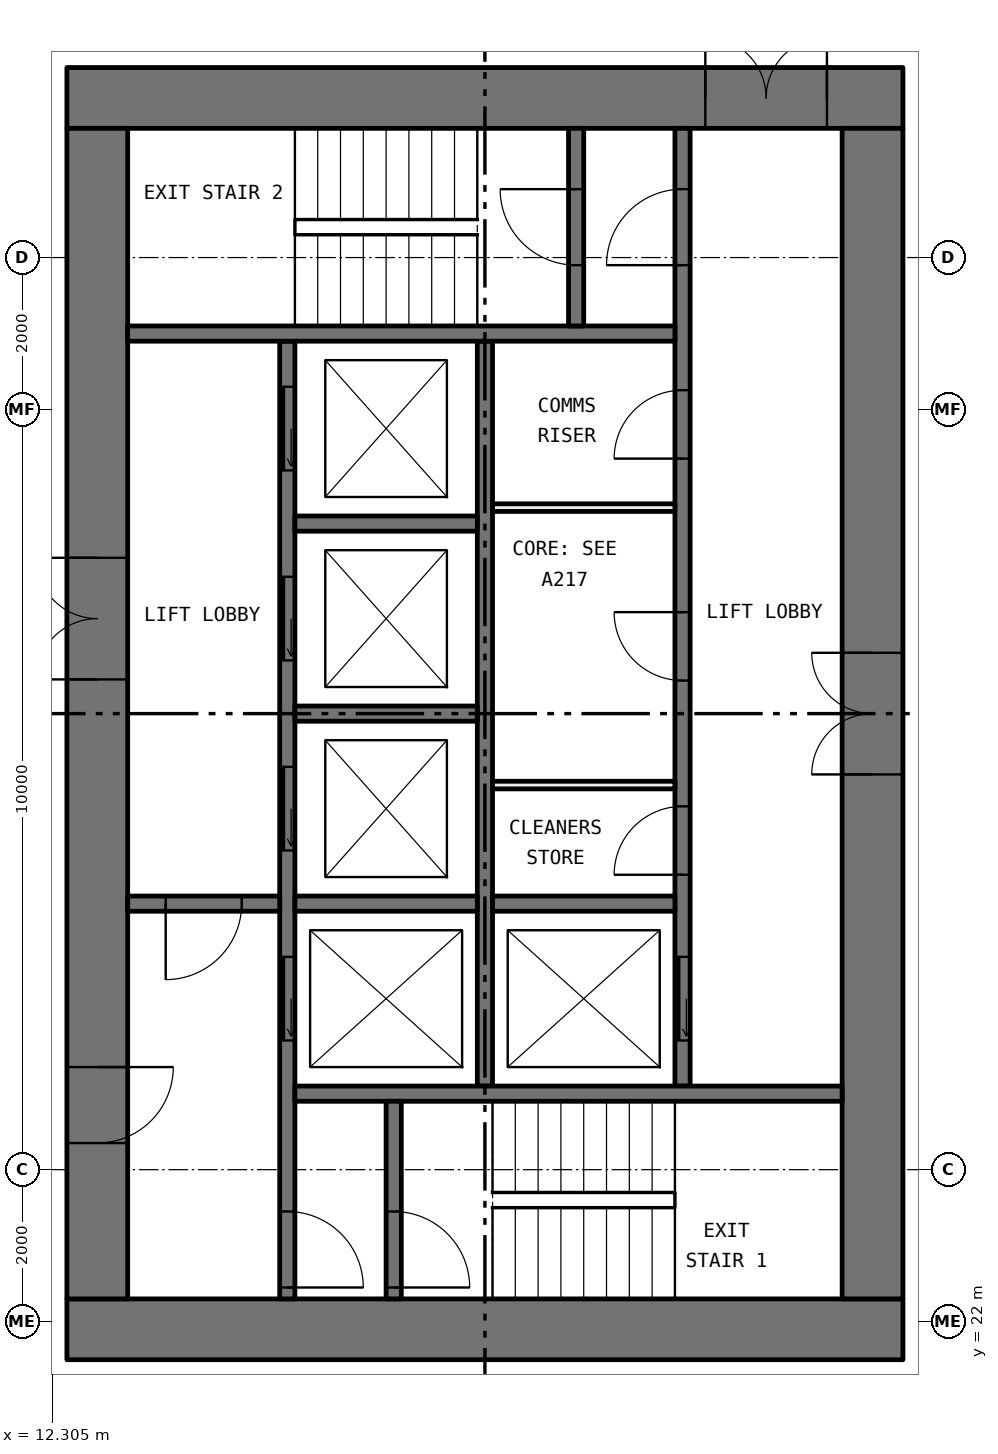
"""IFC4 building model, lengths in metres.
Left out: names, types, materials, properties, quantities, classifications, styles, units other than length and angle.
Written with IfcOpenShell. Run it as: python <this file> out.ifc"""

import sys

from ifc_helpers import new_model, si_unit, direction, frame, frame_2d, origin, place, context, subcontext, project, spatial, rectangle, extrude, element, fill, save


model = new_model("IFC4")
c1 = context("Model", 3, precision=1e-05, world=origin(), true_north=direction((0.0, 1.0)))
c2 = subcontext(c1, "Body", "Model", "MODEL_VIEW")
j1 = project(units=[si_unit("LENGTHUNIT", "METRE"), si_unit("PLANEANGLEUNIT", "RADIAN")], contexts=[c1])
p1 = place(None, origin())
s1 = spatial("IfcSite", under=j1, at=p1, CompositionType="ELEMENT")
p2 = place(p1, origin())
s2 = spatial("IfcBuilding", under=s1, at=p2, CompositionType="ELEMENT")
p3 = place(p2, frame((0.0, 0.0, 67.95)))
s3 = spatial("IfcBuildingStorey", under=s2, at=p3, CompositionType="ELEMENT", Elevation=67.95)
p4 = place(p3, frame((12.5, 21.9, 0.0), z_axis=(0.0, 0.0, 1.0), x_axis=(1.0, 0.0, 0.0)))
e1 = element("IfcWall", 1, at=p4, inside=s3, PredefinedType="SHEAR", context=c2, shape_type="SweptSolid", body=[
    extrude(rectangle(XDim=11.0, YDim=0.8, at=frame_2d((5.5, 0.0))), origin(), (0.0, 0.0, 1.0), 3.05),
])
p5 = place(p3, frame((12.5, 38.1, 0.0), z_axis=(0.0, 0.0, 1.0), x_axis=(1.0, 0.0, 0.0)))
e2 = element("IfcWall", 2, at=p5, inside=s3, PredefinedType="SHEAR", context=c2, shape_type="SweptSolid", body=[
    extrude(rectangle(XDim=11.0, YDim=0.8, at=frame_2d((5.5, 0.0))), origin(), (0.0, 0.0, 1.0), 3.05),
])
p6 = place(p5, frame((8.4, 0.0, 0.0)))
e3 = element("IfcOpeningElement", 3, at=p6, cuts=e2, PredefinedType="OPENING", context=c2, shape_type="SweptSolid", body=[
    extrude(rectangle(XDim=1.6, YDim=2.1, at=frame_2d((0.8, 1.05))), frame((0.0, 0.41, 0.0), z_axis=(0.0, -1.0, 0.0), x_axis=(1.0, 0.0, 0.0)), (0.0, 0.0, 1.0), 0.82),
])
p7 = place(p3, frame((12.9, 22.3, 0.0), z_axis=(0.0, 0.0, 1.0), x_axis=(0.0, 1.0, 0.0)))
e4 = element("IfcWall", 4, at=p7, inside=s3, PredefinedType="SHEAR", context=c2, shape_type="SweptSolid", body=[
    extrude(rectangle(XDim=15.4, YDim=0.8, at=frame_2d((7.7, 0.0))), origin(), (0.0, 0.0, 1.0), 3.05),
])
p8 = place(p7, frame((8.15, 0.0, 0.0)))
e5 = element("IfcOpeningElement", 5, at=p8, cuts=e4, PredefinedType="OPENING", context=c2, shape_type="SweptSolid", body=[
    extrude(rectangle(XDim=1.6, YDim=2.1, at=frame_2d((0.8, 1.05))), frame((0.0, 0.41, 0.0), z_axis=(0.0, -1.0, 0.0), x_axis=(1.0, 0.0, 0.0)), (0.0, 0.0, 1.0), 0.82),
])
p9 = place(p7, frame((2.05, 0.0, 0.0)))
e6 = element("IfcOpeningElement", 6, at=p9, cuts=e4, PredefinedType="OPENING", context=c2, shape_type="SweptSolid", body=[
    extrude(rectangle(XDim=1.0, YDim=2.1, at=frame_2d((0.5, 1.05))), frame((0.0, 0.41, 0.0), z_axis=(0.0, -1.0, 0.0), x_axis=(1.0, 0.0, 0.0)), (0.0, 0.0, 1.0), 0.82),
])
p10 = place(p3, frame((23.1, 22.3, 0.0), z_axis=(0.0, 0.0, 1.0), x_axis=(0.0, 1.0, 0.0)))
e7 = element("IfcWall", 7, at=p10, inside=s3, PredefinedType="SHEAR", context=c2, shape_type="SweptSolid", body=[
    extrude(rectangle(XDim=15.4, YDim=0.8, at=frame_2d((7.7, 0.0))), origin(), (0.0, 0.0, 1.0), 3.05),
])
p11 = place(p10, frame((6.9, 0.0, 0.0)))
e8 = element("IfcOpeningElement", 8, at=p11, cuts=e7, PredefinedType="OPENING", context=c2, shape_type="SweptSolid", body=[
    extrude(rectangle(XDim=1.6, YDim=2.1, at=frame_2d((0.8, 1.05))), frame((0.0, 0.41, 0.0), z_axis=(0.0, -1.0, 0.0), x_axis=(1.0, 0.0, 0.0)), (0.0, 0.0, 1.0), 0.82),
])
p12 = place(p3, frame((15.4, 22.3, 0.0), z_axis=(0.0, 0.0, 1.0), x_axis=(0.0, 1.0, 0.0)))
e9 = element("IfcWall", 9, at=p12, inside=s3, PredefinedType="SOLIDWALL", context=c2, shape_type="SweptSolid", body=[
    extrude(rectangle(XDim=12.6, YDim=0.2, at=frame_2d((6.3, 0.0))), origin(), (0.0, 0.0, 1.0), 3.05),
])
p13 = place(p12, frame((3.4, 0.0, 0.0)))
e10 = element("IfcOpeningElement", 10, at=p13, cuts=e9, PredefinedType="OPENING", context=c2, shape_type="SweptSolid", body=[
    extrude(rectangle(XDim=1.1, YDim=2.1, at=frame_2d((0.55, 1.05))), frame((0.0, 0.11, 0.0), z_axis=(0.0, -1.0, 0.0), x_axis=(1.0, 0.0, 0.0)), (0.0, 0.0, 1.0), 0.22),
])
p14 = place(p12, frame((5.9, 0.0, 0.0)))
e11 = element("IfcOpeningElement", 11, at=p14, cuts=e9, PredefinedType="OPENING", context=c2, shape_type="SweptSolid", body=[
    extrude(rectangle(XDim=1.1, YDim=2.1, at=frame_2d((0.55, 1.05))), frame((0.0, 0.11, 0.0), z_axis=(0.0, -1.0, 0.0), x_axis=(1.0, 0.0, 0.0)), (0.0, 0.0, 1.0), 0.22),
])
p15 = place(p12, frame((8.4, 0.0, 0.0)))
e12 = element("IfcOpeningElement", 12, at=p15, cuts=e9, PredefinedType="OPENING", context=c2, shape_type="SweptSolid", body=[
    extrude(rectangle(XDim=1.1, YDim=2.1, at=frame_2d((0.55, 1.05))), frame((0.0, 0.11, 0.0), z_axis=(0.0, -1.0, 0.0), x_axis=(1.0, 0.0, 0.0)), (0.0, 0.0, 1.0), 0.22),
])
p16 = place(p12, frame((10.9, 0.0, 0.0)))
e13 = element("IfcOpeningElement", 13, at=p16, cuts=e9, PredefinedType="OPENING", context=c2, shape_type="SweptSolid", body=[
    extrude(rectangle(XDim=1.1, YDim=2.1, at=frame_2d((0.55, 1.05))), frame((0.0, 0.11, 0.0), z_axis=(0.0, -1.0, 0.0), x_axis=(1.0, 0.0, 0.0)), (0.0, 0.0, 1.0), 0.22),
])
p17 = place(p12, frame((0.15, 0.0, 0.0)))
e14 = element("IfcOpeningElement", 14, at=p17, cuts=e9, PredefinedType="OPENING", context=c2, shape_type="SweptSolid", body=[
    extrude(rectangle(XDim=1.0, YDim=2.1, at=frame_2d((0.5, 1.05))), frame((0.0, 0.11, 0.0), z_axis=(0.0, -1.0, 0.0), x_axis=(1.0, 0.0, 0.0)), (0.0, 0.0, 1.0), 0.22),
])
p18 = place(p3, frame((20.6, 25.1, 0.0), z_axis=(0.0, 0.0, 1.0), x_axis=(0.0, 1.0, 0.0)))
e15 = element("IfcWall", 15, at=p18, inside=s3, PredefinedType="SOLIDWALL", context=c2, shape_type="SweptSolid", body=[
    extrude(rectangle(XDim=12.6, YDim=0.2, at=frame_2d((6.3, 0.0))), origin(), (0.0, 0.0, 1.0), 3.05),
])
p19 = place(p18, frame((0.6, 0.0, 0.0)))
e16 = element("IfcOpeningElement", 16, at=p19, cuts=e15, PredefinedType="OPENING", context=c2, shape_type="SweptSolid", body=[
    extrude(rectangle(XDim=1.1, YDim=2.1, at=frame_2d((0.55, 1.05))), frame((0.0, 0.11, 0.0), z_axis=(0.0, -1.0, 0.0), x_axis=(1.0, 0.0, 0.0)), (0.0, 0.0, 1.0), 0.22),
])
p20 = place(p18, frame((10.8, 0.0, 0.0)))
e17 = element("IfcOpeningElement", 17, at=p20, cuts=e15, PredefinedType="OPENING", context=c2, shape_type="SweptSolid", body=[
    extrude(rectangle(XDim=1.0, YDim=2.1, at=frame_2d((0.5, 1.05))), frame((0.0, 0.11, 0.0), z_axis=(0.0, -1.0, 0.0), x_axis=(1.0, 0.0, 0.0)), (0.0, 0.0, 1.0), 0.22),
])
p21 = place(p18, frame((2.78, 0.0, 0.0)))
e18 = element("IfcOpeningElement", 18, at=p21, cuts=e15, PredefinedType="OPENING", context=c2, shape_type="SweptSolid", body=[
    extrude(rectangle(XDim=0.9, YDim=2.1, at=frame_2d((0.45, 1.05))), frame((0.0, 0.11, 0.0), z_axis=(0.0, -1.0, 0.0), x_axis=(1.0, 0.0, 0.0)), (0.0, 0.0, 1.0), 0.22),
])
p22 = place(p18, frame((5.335, 0.0, 0.0)))
e19 = element("IfcOpeningElement", 19, at=p22, cuts=e15, PredefinedType="OPENING", context=c2, shape_type="SweptSolid", body=[
    extrude(rectangle(XDim=0.9, YDim=2.1, at=frame_2d((0.45, 1.05))), frame((0.0, 0.11, 0.0), z_axis=(0.0, -1.0, 0.0), x_axis=(1.0, 0.0, 0.0)), (0.0, 0.0, 1.0), 0.22),
])
p23 = place(p18, frame((8.255, 0.0, 0.0)))
e20 = element("IfcOpeningElement", 20, at=p23, cuts=e15, PredefinedType="OPENING", context=c2, shape_type="SweptSolid", body=[
    extrude(rectangle(XDim=0.9, YDim=2.1, at=frame_2d((0.45, 1.05))), frame((0.0, 0.11, 0.0), z_axis=(0.0, -1.0, 0.0), x_axis=(1.0, 0.0, 0.0)), (0.0, 0.0, 1.0), 0.22),
])
p24 = place(p3, frame((18.0, 25.1, 0.0), z_axis=(0.0, 0.0, 1.0), x_axis=(0.0, 1.0, 0.0)))
e21 = element("IfcWall", 21, at=p24, inside=s3, PredefinedType="SOLIDWALL", context=c2, shape_type="SweptSolid", body=[
    extrude(rectangle(XDim=9.8, YDim=0.2, at=frame_2d((4.9, 0.0))), origin(), (0.0, 0.0, 1.0), 3.05),
])
for number, where, z_axis, x_axis in (
    (22, (15.5, 25.0, 0.0), (0.0, 0.0, 1.0), (1.0, 0.0, 0.0)),
    (23, (13.3, 35.0, 0.0), (0.0, 0.0, 1.0), (1.0, 0.0, 0.0)),
):
    element("IfcWall", number, at=place(p3, frame(where, z_axis=z_axis, x_axis=x_axis)), inside=s3, PredefinedType="SOLIDWALL", context=c2, shape_type="SweptSolid", body=[
        extrude(rectangle(XDim=7.2, YDim=0.2, at=frame_2d((3.6, 0.0))), origin(), (0.0, 0.0, 1.0), 3.05),
    ])
p25 = place(p3, frame((13.3, 27.5, 0.0), z_axis=(0.0, 0.0, 1.0), x_axis=(1.0, 0.0, 0.0)))
e24 = element("IfcWall", 24, at=p25, inside=s3, PredefinedType="SOLIDWALL", context=c2, shape_type="SweptSolid", body=[
    extrude(rectangle(XDim=2.0, YDim=0.2, at=frame_2d((1.0, 0.0))), origin(), (0.0, 0.0, 1.0), 3.05),
])
p26 = place(p25, frame((0.5, 0.0, 0.0)))
e25 = element("IfcOpeningElement", 25, at=p26, cuts=e24, PredefinedType="OPENING", context=c2, shape_type="SweptSolid", body=[
    extrude(rectangle(XDim=1.0, YDim=2.1, at=frame_2d((0.5, 1.05))), frame((0.0, 0.11, 0.0), z_axis=(0.0, -1.0, 0.0), x_axis=(1.0, 0.0, 0.0)), (0.0, 0.0, 1.0), 0.22),
])
p27 = place(p3, frame((16.8, 22.3, 0.0), z_axis=(0.0, 0.0, 1.0), x_axis=(0.0, 1.0, 0.0)))
e26 = element("IfcWall", 26, at=p27, inside=s3, PredefinedType="SOLIDWALL", context=c2, shape_type="SweptSolid", body=[
    extrude(rectangle(XDim=2.6, YDim=0.2, at=frame_2d((1.3, 0.0))), origin(), (0.0, 0.0, 1.0), 3.05),
])
p28 = place(p27, frame((0.15, 0.0, 0.0)))
e27 = element("IfcOpeningElement", 27, at=p28, cuts=e26, PredefinedType="OPENING", context=c2, shape_type="SweptSolid", body=[
    extrude(rectangle(XDim=1.0, YDim=2.1, at=frame_2d((0.5, 1.05))), frame((0.0, 0.11, 0.0), z_axis=(0.0, -1.0, 0.0), x_axis=(1.0, 0.0, 0.0)), (0.0, 0.0, 1.0), 0.22),
])
p29 = place(p3, frame((19.2, 35.1, 0.0), z_axis=(0.0, 0.0, 1.0), x_axis=(0.0, 1.0, 0.0)))
e28 = element("IfcWall", 28, at=p29, inside=s3, PredefinedType="SOLIDWALL", context=c2, shape_type="SweptSolid", body=[
    extrude(rectangle(XDim=2.6, YDim=0.2, at=frame_2d((1.3, 0.0))), origin(), (0.0, 0.0, 1.0), 3.05),
])
p30 = place(p29, frame((0.8, 0.0, 0.0)))
e29 = element("IfcOpeningElement", 29, at=p30, cuts=e28, PredefinedType="OPENING", context=c2, shape_type="SweptSolid", body=[
    extrude(rectangle(XDim=1.0, YDim=2.1, at=frame_2d((0.5, 1.05))), frame((0.0, 0.11, 0.0), z_axis=(0.0, -1.0, 0.0), x_axis=(1.0, 0.0, 0.0)), (0.0, 0.0, 1.0), 0.22),
])
for number, where, z_axis, x_axis in (
    (30, (15.5, 27.5, 0.0), (0.0, 0.0, 1.0), (1.0, 0.0, 0.0)),
    (31, (15.5, 30.0, 0.0), (0.0, 0.0, 1.0), (1.0, 0.0, 0.0)),
    (32, (15.5, 32.5, 0.0), (0.0, 0.0, 1.0), (1.0, 0.0, 0.0)),
    (33, (18.1, 27.5, 0.0), (0.0, 0.0, 1.0), (1.0, 0.0, 0.0)),
):
    element("IfcWall", number, at=place(p3, frame(where, z_axis=z_axis, x_axis=x_axis)), inside=s3, PredefinedType="SOLIDWALL", context=c2, shape_type="SweptSolid", body=[
        extrude(rectangle(XDim=2.4, YDim=0.2, at=frame_2d((1.2, 0.0))), origin(), (0.0, 0.0, 1.0), 3.05),
    ])
for number, where, z_axis, x_axis in (
    (34, (18.1, 29.06, 0.0), (0.0, 0.0, 1.0), (1.0, 0.0, 0.0)),
    (35, (18.1, 32.71, 0.0), (0.0, 0.0, 1.0), (1.0, 0.0, 0.0)),
):
    element("IfcWall", number, at=place(p3, frame(where, z_axis=z_axis, x_axis=x_axis)), inside=s3, PredefinedType="PARTITIONING", context=c2, shape_type="SweptSolid", body=[
        extrude(rectangle(XDim=2.4, YDim=0.1, at=frame_2d((1.2, 0.0))), origin(), (0.0, 0.0, 1.0), 3.05),
    ])
p31 = place(p19, origin())
e36 = element("IfcDoor", 36, at=p31, inside=s3, OperationType="SLIDING_TO_LEFT", PredefinedType="DOOR", context=c2, shape_type="SweptSolid", body=[
    extrude(rectangle(XDim=1.1, YDim=2.1, at=frame_2d((0.55, 1.05))), frame((0.0, 0.025, 0.0), z_axis=(0.0, -1.0, 0.0), x_axis=(1.0, 0.0, 0.0)), (0.0, 0.0, 1.0), 0.05),
])
fill(e16, e36)
p32 = place(p13, origin())
e37 = element("IfcDoor", 37, at=p32, inside=s3, OperationType="SLIDING_TO_LEFT", PredefinedType="DOOR", context=c2, shape_type="SweptSolid", body=[
    extrude(rectangle(XDim=1.1, YDim=2.1, at=frame_2d((0.55, 1.05))), frame((0.0, 0.025, 0.0), z_axis=(0.0, -1.0, 0.0), x_axis=(1.0, 0.0, 0.0)), (0.0, 0.0, 1.0), 0.05),
])
fill(e10, e37)
p33 = place(p14, origin())
e38 = element("IfcDoor", 38, at=p33, inside=s3, OperationType="SLIDING_TO_LEFT", PredefinedType="DOOR", context=c2, shape_type="SweptSolid", body=[
    extrude(rectangle(XDim=1.1, YDim=2.1, at=frame_2d((0.55, 1.05))), frame((0.0, 0.025, 0.0), z_axis=(0.0, -1.0, 0.0), x_axis=(1.0, 0.0, 0.0)), (0.0, 0.0, 1.0), 0.05),
])
fill(e11, e38)
p34 = place(p15, origin())
e39 = element("IfcDoor", 39, at=p34, inside=s3, OperationType="SLIDING_TO_LEFT", PredefinedType="DOOR", context=c2, shape_type="SweptSolid", body=[
    extrude(rectangle(XDim=1.1, YDim=2.1, at=frame_2d((0.55, 1.05))), frame((0.0, 0.025, 0.0), z_axis=(0.0, -1.0, 0.0), x_axis=(1.0, 0.0, 0.0)), (0.0, 0.0, 1.0), 0.05),
])
fill(e12, e39)
p35 = place(p16, origin())
e40 = element("IfcDoor", 40, at=p35, inside=s3, OperationType="SLIDING_TO_LEFT", PredefinedType="DOOR", context=c2, shape_type="SweptSolid", body=[
    extrude(rectangle(XDim=1.1, YDim=2.1, at=frame_2d((0.55, 1.05))), frame((0.0, 0.025, 0.0), z_axis=(0.0, -1.0, 0.0), x_axis=(1.0, 0.0, 0.0)), (0.0, 0.0, 1.0), 0.05),
])
fill(e13, e40)
p36 = place(p28, frame((1.0, 0.0, 0.0), x_axis=(-1.0, 0.0, 0.0)))
e41 = element("IfcDoor", 41, at=p36, inside=s3, OperationType="SINGLE_SWING_LEFT", PredefinedType="DOOR", context=c2, shape_type="SweptSolid", body=[
    extrude(rectangle(XDim=1.0, YDim=2.1, at=frame_2d((0.5, 1.05))), frame((0.0, 0.025, 0.0), z_axis=(0.0, -1.0, 0.0), x_axis=(1.0, 0.0, 0.0)), (0.0, 0.0, 1.0), 0.05),
])
fill(e27, e41)
p37 = place(p17, frame((1.0, 0.0, 0.0), x_axis=(-1.0, 0.0, 0.0)))
e42 = element("IfcDoor", 42, at=p37, inside=s3, OperationType="SINGLE_SWING_LEFT", PredefinedType="DOOR", context=c2, shape_type="SweptSolid", body=[
    extrude(rectangle(XDim=1.0, YDim=2.1, at=frame_2d((0.5, 1.05))), frame((0.0, 0.025, 0.0), z_axis=(0.0, -1.0, 0.0), x_axis=(1.0, 0.0, 0.0)), (0.0, 0.0, 1.0), 0.05),
])
fill(e14, e42)
p38 = place(p20, origin())
e43 = element("IfcDoor", 43, at=p38, inside=s3, OperationType="SINGLE_SWING_RIGHT", PredefinedType="DOOR", context=c2, shape_type="SweptSolid", body=[
    extrude(rectangle(XDim=1.0, YDim=2.1, at=frame_2d((0.5, 1.05))), frame((0.0, 0.025, 0.0), z_axis=(0.0, -1.0, 0.0), x_axis=(1.0, 0.0, 0.0)), (0.0, 0.0, 1.0), 0.05),
])
fill(e17, e43)
p39 = place(p30, origin())
e44 = element("IfcDoor", 44, at=p39, inside=s3, OperationType="SINGLE_SWING_LEFT", PredefinedType="DOOR", context=c2, shape_type="SweptSolid", body=[
    extrude(rectangle(XDim=1.0, YDim=2.1, at=frame_2d((0.5, 1.05))), frame((0.0, 0.025, 0.0), z_axis=(0.0, -1.0, 0.0), x_axis=(1.0, 0.0, 0.0)), (0.0, 0.0, 1.0), 0.05),
])
fill(e29, e44)
p40 = place(p26, frame((1.0, 0.0, 0.0), x_axis=(-1.0, 0.0, 0.0)))
e45 = element("IfcDoor", 45, at=p40, inside=s3, OperationType="SINGLE_SWING_LEFT", PredefinedType="DOOR", context=c2, shape_type="SweptSolid", body=[
    extrude(rectangle(XDim=1.0, YDim=2.1, at=frame_2d((0.5, 1.05))), frame((0.0, 0.025, 0.0), z_axis=(0.0, -1.0, 0.0), x_axis=(1.0, 0.0, 0.0)), (0.0, 0.0, 1.0), 0.05),
])
fill(e25, e45)
p41 = place(p8, origin())
e46 = element("IfcDoor", 46, at=p41, inside=s3, OperationType="DOUBLE_DOOR_SINGLE_SWING", PredefinedType="DOOR", context=c2, shape_type="SweptSolid", body=[
    extrude(rectangle(XDim=1.6, YDim=2.1, at=frame_2d((0.8, 1.05))), frame((0.0, 0.025, 0.0), z_axis=(0.0, -1.0, 0.0), x_axis=(1.0, 0.0, 0.0)), (0.0, 0.0, 1.0), 0.05),
])
fill(e5, e46)
p42 = place(p9, frame((1.0, 0.0, 0.0), x_axis=(-1.0, 0.0, 0.0)))
e47 = element("IfcDoor", 47, at=p42, inside=s3, OperationType="SINGLE_SWING_RIGHT", PredefinedType="DOOR", context=c2, shape_type="SweptSolid", body=[
    extrude(rectangle(XDim=1.0, YDim=2.1, at=frame_2d((0.5, 1.05))), frame((0.0, 0.025, 0.0), z_axis=(0.0, -1.0, 0.0), x_axis=(1.0, 0.0, 0.0)), (0.0, 0.0, 1.0), 0.05),
])
fill(e6, e47)
p43 = place(p6, origin())
e48 = element("IfcDoor", 48, at=p43, inside=s3, OperationType="DOUBLE_DOOR_SINGLE_SWING", PredefinedType="DOOR", context=c2, shape_type="SweptSolid", body=[
    extrude(rectangle(XDim=1.6, YDim=2.1, at=frame_2d((0.8, 1.05))), frame((0.0, 0.025, 0.0), z_axis=(0.0, -1.0, 0.0), x_axis=(1.0, 0.0, 0.0)), (0.0, 0.0, 1.0), 0.05),
])
fill(e3, e48)
p44 = place(p11, origin())
e49 = element("IfcDoor", 49, at=p44, inside=s3, OperationType="DOUBLE_DOOR_SINGLE_SWING", PredefinedType="DOOR", context=c2, shape_type="SweptSolid", body=[
    extrude(rectangle(XDim=1.6, YDim=2.1, at=frame_2d((0.8, 1.05))), frame((0.0, 0.025, 0.0), z_axis=(0.0, -1.0, 0.0), x_axis=(1.0, 0.0, 0.0)), (0.0, 0.0, 1.0), 0.05),
])
fill(e8, e49)
p45 = place(p21, origin())
e50 = element("IfcDoor", 50, at=p45, inside=s3, OperationType="SINGLE_SWING_RIGHT", PredefinedType="DOOR", context=c2, shape_type="SweptSolid", body=[
    extrude(rectangle(XDim=0.9, YDim=2.1, at=frame_2d((0.45, 1.05))), frame((0.0, 0.025, 0.0), z_axis=(0.0, -1.0, 0.0), x_axis=(1.0, 0.0, 0.0)), (0.0, 0.0, 1.0), 0.05),
])
fill(e18, e50)
p46 = place(p22, origin())
e51 = element("IfcDoor", 51, at=p46, inside=s3, OperationType="SINGLE_SWING_LEFT", PredefinedType="DOOR", context=c2, shape_type="SweptSolid", body=[
    extrude(rectangle(XDim=0.9, YDim=2.1, at=frame_2d((0.45, 1.05))), frame((0.0, 0.025, 0.0), z_axis=(0.0, -1.0, 0.0), x_axis=(1.0, 0.0, 0.0)), (0.0, 0.0, 1.0), 0.05),
])
fill(e19, e51)
p47 = place(p23, origin())
e52 = element("IfcDoor", 52, at=p47, inside=s3, OperationType="SINGLE_SWING_RIGHT", PredefinedType="DOOR", context=c2, shape_type="SweptSolid", body=[
    extrude(rectangle(XDim=0.9, YDim=2.1, at=frame_2d((0.45, 1.05))), frame((0.0, 0.025, 0.0), z_axis=(0.0, -1.0, 0.0), x_axis=(1.0, 0.0, 0.0)), (0.0, 0.0, 1.0), 0.05),
])
fill(e20, e52)
save(model, sys.argv[1])
